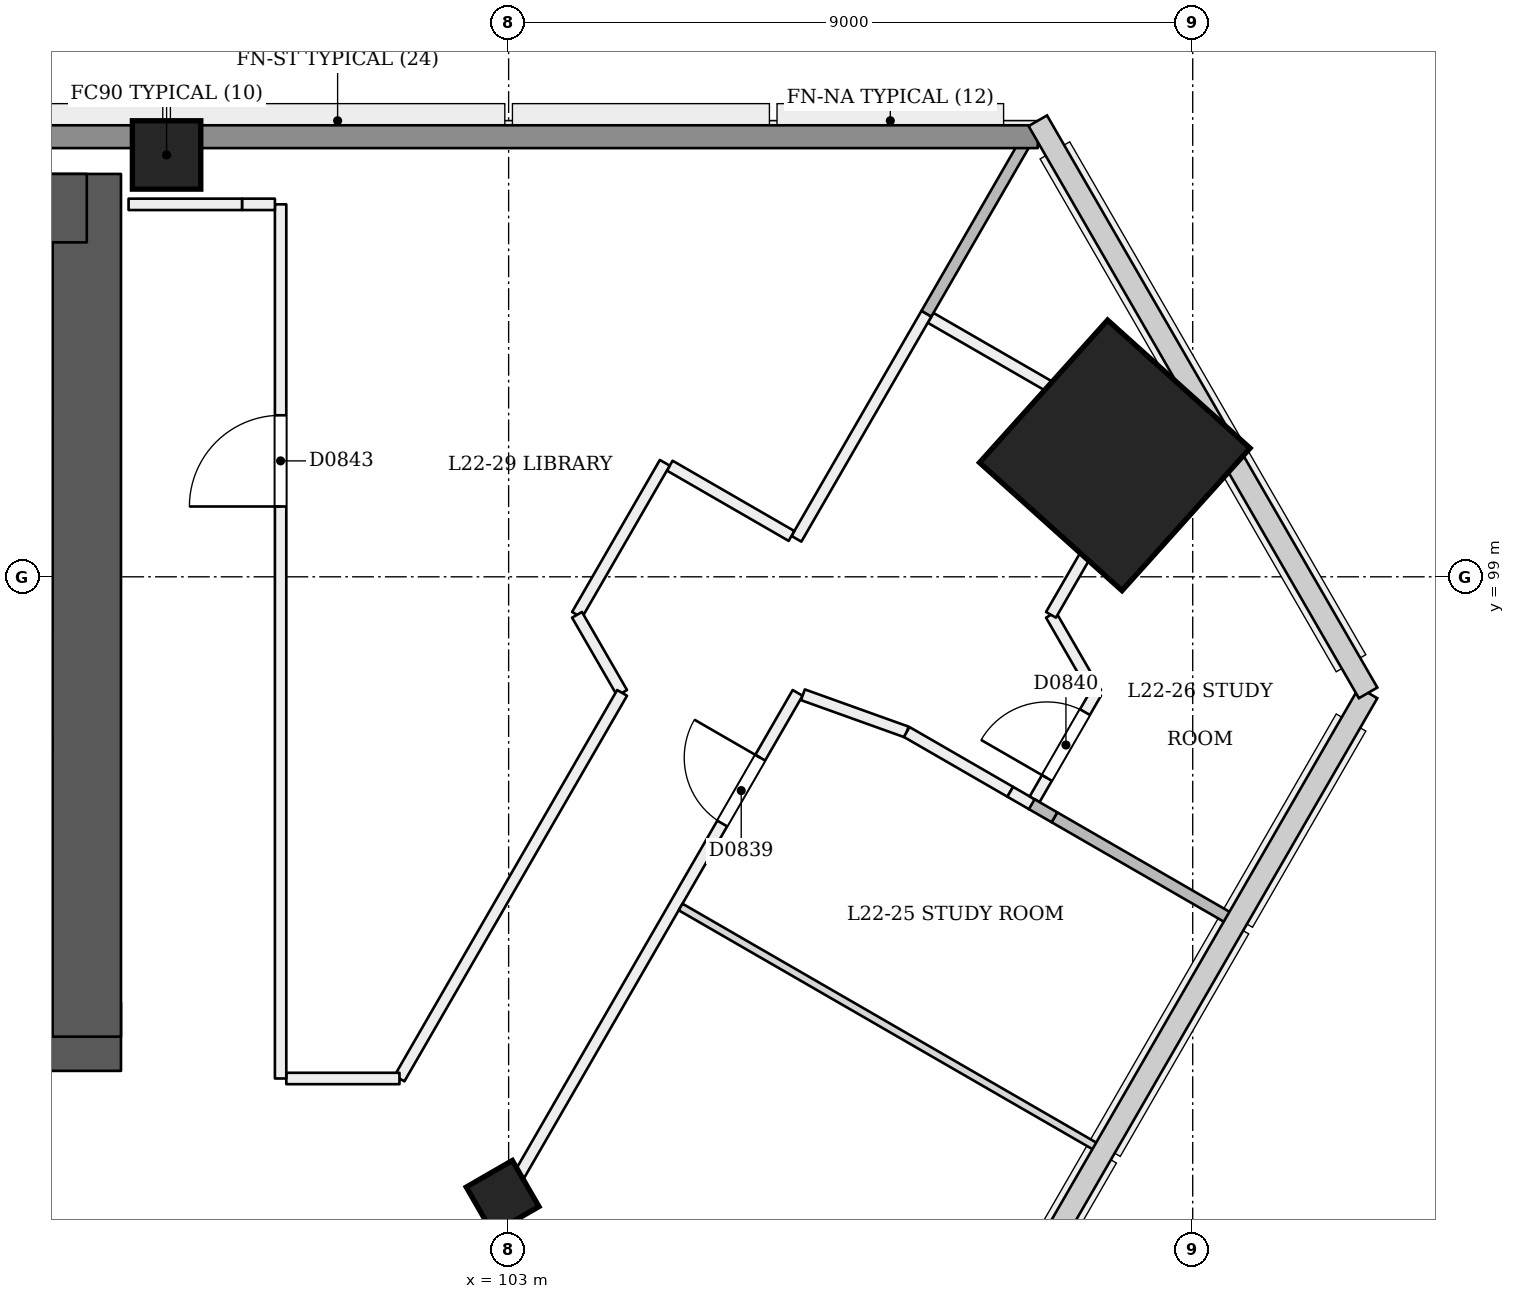
"""IFC4 building model, lengths in metres.
Left out: names, types, materials, properties, quantities, classifications, styles, units other than length and angle.
Written with IfcOpenShell. Run it as: python <this file> out.ifc"""

import sys

from ifc_helpers import new_model, si_unit, direction, frame, frame_2d, origin, origin_2d, place, context, subcontext, project, spatial, rectangle, extrude, element, fill, save


model = new_model("IFC4")
c1 = context("Model", 3, precision=1e-05, world=origin(), true_north=direction((0.0, 1.0)))
c2 = subcontext(c1, "Body", "Model", "MODEL_VIEW")
j1 = project(units=[si_unit("LENGTHUNIT", "METRE"), si_unit("PLANEANGLEUNIT", "RADIAN")], contexts=[c1])
p1 = place(None, origin())
s1 = spatial("IfcSite", under=j1, at=p1, CompositionType="ELEMENT")
p2 = place(p1, origin())
s2 = spatial("IfcBuilding", under=s1, at=p2, CompositionType="ELEMENT")
p3 = place(p2, frame((0.0, 0.0, 88.2)))
s3 = spatial("IfcBuildingStorey", under=s2, at=p3, CompositionType="ELEMENT", Elevation=88.2)
p4 = place(p3, frame((72.55, 92.95, 0.0), z_axis=(0.0, 0.0, 1.0), x_axis=(1.0, 0.0, 0.0)))
e1 = element("IfcWall", 1, at=p4, inside=s3, PredefinedType="SHEAR", context=c2, shape_type="SweptSolid", body=[
    extrude(rectangle(XDim=25.35, YDim=0.9, at=frame_2d((12.675, 0.0))), origin(), (0.0, 0.0, 1.0), 3.6),
])
p5 = place(p4, frame((1.25, 0.0, 0.0)))
e2 = element("IfcOpeningElement", 2, at=p5, cuts=e1, PredefinedType="OPENING", context=c2, shape_type="SweptSolid", body=[
    extrude(rectangle(XDim=1.2, YDim=2.1, at=frame_2d((0.6, 1.05))), frame((0.0, 0.46, 0.0), z_axis=(0.0, -1.0, 0.0), x_axis=(1.0, 0.0, 0.0)), (0.0, 0.0, 1.0), 0.921),
])
p6 = place(p4, frame((3.45, 0.0, 0.0)))
e3 = element("IfcOpeningElement", 3, at=p6, cuts=e1, PredefinedType="OPENING", context=c2, shape_type="SweptSolid", body=[
    extrude(rectangle(XDim=1.2, YDim=2.1, at=frame_2d((0.6, 1.05))), frame((0.0, 0.46, 0.0), z_axis=(0.0, -1.0, 0.0), x_axis=(1.0, 0.0, 0.0)), (0.0, 0.0, 1.0), 0.921),
])
p7 = place(p4, frame((13.45, 0.0, 0.0)))
e4 = element("IfcOpeningElement", 4, at=p7, cuts=e1, PredefinedType="OPENING", context=c2, shape_type="SweptSolid", body=[
    extrude(rectangle(XDim=1.2, YDim=2.1, at=frame_2d((0.6, 1.05))), frame((0.0, 0.46, 0.0), z_axis=(0.0, -1.0, 0.0), x_axis=(1.0, 0.0, 0.0)), (0.0, 0.0, 1.0), 0.921),
])
p8 = place(p4, frame((15.712, 0.0, 0.0)))
e5 = element("IfcOpeningElement", 5, at=p8, cuts=e1, PredefinedType="OPENING", context=c2, shape_type="SweptSolid", body=[
    extrude(rectangle(XDim=1.0, YDim=2.1, at=frame_2d((0.5, 1.05))), frame((0.0, 0.46, 0.0), z_axis=(0.0, -1.0, 0.0), x_axis=(1.0, 0.0, 0.0)), (0.0, 0.0, 1.0), 0.921),
])
p9 = place(p4, frame((18.35, 0.0, 0.0)))
e6 = element("IfcOpeningElement", 6, at=p9, cuts=e1, PredefinedType="OPENING", context=c2, shape_type="SweptSolid", body=[
    extrude(rectangle(XDim=1.0, YDim=2.1, at=frame_2d((0.5, 1.05))), frame((0.0, 0.46, 0.0), z_axis=(0.0, -1.0, 0.0), x_axis=(1.0, 0.0, 0.0)), (0.0, 0.0, 1.0), 0.921),
])
p10 = place(p4, frame((21.938, 0.0, 0.0)))
e7 = element("IfcOpeningElement", 7, at=p10, cuts=e1, PredefinedType="OPENING", context=c2, shape_type="SweptSolid", body=[
    extrude(rectangle(XDim=1.0, YDim=2.1, at=frame_2d((0.5, 1.05))), frame((0.0, 0.46, 0.0), z_axis=(0.0, -1.0, 0.0), x_axis=(1.0, 0.0, 0.0)), (0.0, 0.0, 1.0), 0.921),
])
p11 = place(p3, frame((97.45, 92.95, 0.0), z_axis=(0.0, 0.0, 1.0), x_axis=(0.0, 1.0, 0.0)))
e8 = element("IfcWall", 8, at=p11, inside=s3, PredefinedType="SHEAR", context=c2, shape_type="SweptSolid", body=[
    extrude(rectangle(XDim=11.35, YDim=0.9, at=frame_2d((5.675, 0.0))), origin(), (0.0, 0.0, 1.0), 3.6),
])
p12 = place(p3, frame((97.45, 103.85, 0.0), z_axis=(0.0, 0.0, 1.0), x_axis=(-1.0, 0.0, 0.0)))
e9 = element("IfcWall", 9, at=p12, inside=s3, PredefinedType="SHEAR", context=c2, shape_type="SweptSolid", body=[
    extrude(rectangle(XDim=25.35, YDim=0.9, at=frame_2d((12.675, 0.0))), origin(), (0.0, 0.0, 1.0), 3.6),
])
p13 = place(p3, frame((102.948, 90.796, -0.021), z_axis=(-0.022221406801, 0.038413224561, 0.999014831351), x_axis=(-0.499512940858, -0.866022219206, 0.022188685317)))
e10 = element("IfcColumn", 10, at=p13, inside=s3, PredefinedType="COLUMN", context=c2, shape_type="SweptSolid", body=[
    extrude(rectangle(XDim=0.7, YDim=0.7, at=origin_2d()), origin(), (0.0, 0.0, 1.0), 3.604),
])
p14 = place(p3, frame((111.009, 100.586, 0.0), z_axis=(-0.028401796786, 0.009286506348, 0.999553449666), x_axis=(0.498886368713, -0.866382390598, 0.022224859352)))
e11 = element("IfcColumn", 11, at=p14, inside=s3, PredefinedType="COLUMN", context=c2, shape_type="SweptSolid", body=[
    extrude(rectangle(XDim=2.52, YDim=2.52, at=origin_2d()), origin(), (0.0, 0.0, 1.0), 3.602),
])
p15 = place(p3, frame((98.5, 104.55, 0.0), z_axis=(0.0, 0.0, 1.0), x_axis=(1.0, 0.0, 0.0)))
e12 = element("IfcColumn", 12, at=p15, inside=s3, PredefinedType="COLUMN", context=c2, shape_type="SweptSolid", body=[
    extrude(rectangle(XDim=0.9, YDim=0.9, at=origin_2d()), origin(), (0.0, 0.0, 1.0), 3.6),
])
p16 = place(p3, frame((87.198, 63.517, 0.0), z_axis=(0.0, 0.0, 1.0), x_axis=(0.499999136801, 0.866025902152, 0.0)))
e13 = element("IfcWall", 13, at=p16, inside=s3, PredefinedType="PARTITIONING", context=c2, shape_type="SweptSolid", body=[
    extrude(rectangle(XDim=39.209, YDim=0.15, at=frame_2d((19.604, 0.0))), origin(), (0.0, 0.0, 1.0), 2.7),
])
p17 = place(p16, frame((2.8, 0.0, 0.0)))
e14 = element("IfcOpeningElement", 14, at=p17, cuts=e13, PredefinedType="OPENING", context=c2, shape_type="SweptSolid", body=[
    extrude(rectangle(XDim=1.2, YDim=2.1, at=frame_2d((0.6, 1.05))), frame((0.0, 0.085, 0.0), z_axis=(0.0, -1.0, 0.0), x_axis=(1.0, 0.0, 0.0)), (0.0, 0.0, 1.0), 0.171),
])
p18 = place(p16, frame((9.72, 0.0, 0.0)))
e15 = element("IfcOpeningElement", 15, at=p18, cuts=e13, PredefinedType="OPENING", context=c2, shape_type="SweptSolid", body=[
    extrude(rectangle(XDim=1.0, YDim=2.1, at=frame_2d((0.5, 1.05))), frame((0.0, 0.085, 0.0), z_axis=(0.0, -1.0, 0.0), x_axis=(1.0, 0.0, 0.0)), (0.0, 0.0, 1.0), 0.171),
])
p19 = place(p16, frame((16.395, 0.0, 0.0)))
e16 = element("IfcOpeningElement", 16, at=p19, cuts=e13, PredefinedType="OPENING", context=c2, shape_type="SweptSolid", body=[
    extrude(rectangle(XDim=1.0, YDim=2.1, at=frame_2d((0.5, 1.05))), frame((0.0, 0.085, 0.0), z_axis=(0.0, -1.0, 0.0), x_axis=(1.0, 0.0, 0.0)), (0.0, 0.0, 1.0), 0.171),
])
p20 = place(p16, frame((19.75, 0.0, 0.0)))
e17 = element("IfcOpeningElement", 17, at=p20, cuts=e13, PredefinedType="OPENING", context=c2, shape_type="SweptSolid", body=[
    extrude(rectangle(XDim=1.0, YDim=2.1, at=frame_2d((0.5, 1.05))), frame((0.0, 0.085, 0.0), z_axis=(0.0, -1.0, 0.0), x_axis=(1.0, 0.0, 0.0)), (0.0, 0.0, 1.0), 0.171),
])
p21 = place(p16, frame((25.395, 0.0, 0.0)))
e18 = element("IfcOpeningElement", 18, at=p21, cuts=e13, PredefinedType="OPENING", context=c2, shape_type="SweptSolid", body=[
    extrude(rectangle(XDim=1.0, YDim=2.1, at=frame_2d((0.5, 1.05))), frame((0.0, 0.085, 0.0), z_axis=(0.0, -1.0, 0.0), x_axis=(1.0, 0.0, 0.0)), (0.0, 0.0, 1.0), 0.171),
])
p22 = place(p16, frame((29.8, 0.0, 0.0)))
e19 = element("IfcOpeningElement", 19, at=p22, cuts=e13, PredefinedType="OPENING", context=c2, shape_type="SweptSolid", body=[
    extrude(rectangle(XDim=1.2, YDim=2.1, at=frame_2d((0.6, 1.05))), frame((0.0, 0.085, 0.0), z_axis=(0.0, -1.0, 0.0), x_axis=(1.0, 0.0, 0.0)), (0.0, 0.0, 1.0), 0.171),
])
p23 = place(p16, frame((37.225, 0.0, 0.0)))
e20 = element("IfcOpeningElement", 20, at=p23, cuts=e13, PredefinedType="OPENING", context=c2, shape_type="SweptSolid", body=[
    extrude(rectangle(XDim=1.0, YDim=2.1, at=frame_2d((0.5, 1.05))), frame((0.0, 0.085, 0.0), z_axis=(0.0, -1.0, 0.0), x_axis=(1.0, 0.0, 0.0)), (0.0, 0.0, 1.0), 0.171),
])
p24 = place(p3, frame((106.872, 97.448, 0.0), z_axis=(0.0, 0.0, 1.0), x_axis=(0.941287948334, -0.337604796059, 0.0)))
e21 = element("IfcWall", 21, at=p24, inside=s3, PredefinedType="PARTITIONING", context=c2, shape_type="SweptSolid", body=[
    extrude(rectangle(XDim=1.451, YDim=0.15, at=frame_2d((0.725, 0.0))), origin(), (0.0, 0.0, 1.0), 3.1),
])
p25 = place(p3, frame((108.237, 96.958, 0.0), z_axis=(0.0, 0.0, 1.0), x_axis=(0.86602790099, -0.499995674689, 0.0)))
e22 = element("IfcWall", 22, at=p25, inside=s3, PredefinedType="PARTITIONING", context=c2, shape_type="SweptSolid", body=[
    extrude(rectangle(XDim=1.573, YDim=0.15, at=frame_2d((0.786, 0.0))), origin(), (0.0, 0.0, 1.0), 3.1),
])
p26 = place(p3, frame((109.599, 96.172, 0.0), z_axis=(0.0, 0.0, 1.0), x_axis=(0.866115353951, -0.499844169366, 0.0)))
e23 = element("IfcWall", 23, at=p26, inside=s3, PredefinedType="PARTITIONING", context=c2, shape_type="SweptSolid", body=[
    extrude(rectangle(XDim=0.347, YDim=0.15, at=frame_2d((0.174, 0.0))), origin(), (0.0, 0.0, 1.0), 2.6),
])
p27 = place(p3, frame((109.92, 96.073, 0.0), z_axis=(0.0, 0.0, 1.0), x_axis=(0.500005767435, 0.866022073929, 0.0)))
e24 = element("IfcWall", 24, at=p27, inside=s3, PredefinedType="PARTITIONING", context=c2, shape_type="SweptSolid", body=[
    extrude(rectangle(XDim=1.616, YDim=0.15, at=frame_2d((0.808, 0.0))), origin(), (0.0, 0.0, 1.0), 2.6),
])
p28 = place(p27, frame((0.324, 0.0, 0.0)))
e25 = element("IfcOpeningElement", 25, at=p28, cuts=e24, PredefinedType="OPENING", context=c2, shape_type="SweptSolid", body=[
    extrude(rectangle(XDim=1.0, YDim=2.1, at=frame_2d((0.5, 1.05))), frame((0.0, 0.085, 0.0), z_axis=(0.0, -1.0, 0.0), x_axis=(1.0, 0.0, 0.0)), (0.0, 0.0, 1.0), 0.171),
])
p29 = place(p3, frame((110.728, 97.473, 0.0), z_axis=(0.0, 0.0, 1.0), x_axis=(-0.500013496215, 0.866017611601, 0.0)))
e26 = element("IfcWall", 26, at=p29, inside=s3, PredefinedType="PARTITIONING", context=c2, shape_type="SweptSolid", body=[
    extrude(rectangle(XDim=1.186, YDim=0.15, at=frame_2d((0.593, 0.0))), origin(), (0.0, 0.0, 1.0), 2.6),
])
p30 = place(p3, frame((110.135, 98.5, 0.0), z_axis=(0.0, 0.0, 1.0), x_axis=(0.500072327845, 0.865983641256, 0.0)))
e27 = element("IfcWall", 27, at=p30, inside=s3, PredefinedType="PARTITIONING", context=c2, shape_type="SweptSolid", body=[
    extrude(rectangle(XDim=2.517, YDim=0.15, at=frame_2d((1.258, 0.0))), origin(), (0.0, 0.0, 1.0), 2.6),
])
p31 = place(p3, frame((111.431, 100.744, 0.0), z_axis=(0.0, 0.0, 1.0), x_axis=(-0.866002163101, 0.500040251884, 0.0)))
e28 = element("IfcWall", 28, at=p31, inside=s3, PredefinedType="PARTITIONING", context=c2, shape_type="SweptSolid", body=[
    extrude(rectangle(XDim=3.325, YDim=0.15, at=frame_2d((1.663, 0.0))), origin(), (0.0, 0.0, 1.0), 3.1),
])
p32 = place(p3, frame((108.497, 102.462, 0.0), z_axis=(0.0, 0.0, 1.0), x_axis=(-0.50003140069, -0.866007273829, 0.0)))
e29 = element("IfcWall", 29, at=p32, inside=s3, PredefinedType="PARTITIONING", context=c2, shape_type="SweptSolid", body=[
    extrude(rectangle(XDim=3.42, YDim=0.15, at=frame_2d((1.71, 0.0))), origin(), (0.0, 0.0, 1.0), 2.6),
])
p33 = place(p3, frame((106.721, 99.538, 0.0), z_axis=(0.0, 0.0, 1.0), x_axis=(-0.866058118026, 0.49994333299, 0.0)))
e30 = element("IfcWall", 30, at=p33, inside=s3, PredefinedType="PARTITIONING", context=c2, shape_type="SweptSolid", body=[
    extrude(rectangle(XDim=1.85, YDim=0.15, at=frame_2d((0.925, 0.0))), origin(), (0.0, 0.0, 1.0), 3.1),
])
p34 = place(p3, frame((105.054, 100.5, 0.0), z_axis=(0.0, 0.0, 1.0), x_axis=(-0.500027479704, -0.866009537788, 0.0)))
e31 = element("IfcWall", 31, at=p34, inside=s3, PredefinedType="PARTITIONING", context=c2, shape_type="SweptSolid", body=[
    extrude(rectangle(XDim=2.309, YDim=0.15, at=frame_2d((1.155, 0.0))), origin(), (0.0, 0.0, 1.0), 3.1),
])
p35 = place(p3, frame((103.9, 98.5, 0.0), z_axis=(0.0, 0.0, 1.0), x_axis=(0.500013496215, -0.866017611601, 0.0)))
e32 = element("IfcWall", 32, at=p35, inside=s3, PredefinedType="PARTITIONING", context=c2, shape_type="SweptSolid", body=[
    extrude(rectangle(XDim=1.186, YDim=0.15, at=frame_2d((0.593, 0.0))), origin(), (0.0, 0.0, 1.0), 3.1),
])
p36 = place(p3, frame((104.493, 97.473, 0.0), z_axis=(0.0, 0.0, 1.0), x_axis=(-0.499976204152, -0.866039141888, 0.0)))
e33 = element("IfcWall", 33, at=p36, inside=s3, PredefinedType="PARTITIONING", context=c2, shape_type="SweptSolid", body=[
    extrude(rectangle(XDim=5.858, YDim=0.15, at=frame_2d((2.929, 0.0))), origin(), (0.0, 0.0, 1.0), 3.1),
])
p37 = place(p3, frame((101.564, 92.4, 0.0), z_axis=(0.0, 0.0, 1.0), x_axis=(-1.0, 0.0, 0.0)))
e34 = element("IfcWall", 34, at=p37, inside=s3, PredefinedType="PARTITIONING", context=c2, shape_type="SweptSolid", body=[
    extrude(rectangle(XDim=1.489, YDim=0.15, at=frame_2d((0.745, 0.0))), origin(), (0.0, 0.0, 1.0), 3.1),
])
p38 = place(p3, frame((100.0, 92.4, 0.0), z_axis=(0.0, 0.0, 1.0), x_axis=(0.0, 1.0, 0.0)))
e35 = element("IfcWall", 35, at=p38, inside=s3, PredefinedType="PARTITIONING", context=c2, shape_type="SweptSolid", body=[
    extrude(rectangle(XDim=11.5, YDim=0.15, at=frame_2d((5.75, 0.0))), origin(), (0.0, 0.0, 1.0), 2.6),
])
p39 = place(p38, frame((7.525, 0.0, 0.0)))
e36 = element("IfcOpeningElement", 36, at=p39, cuts=e35, PredefinedType="OPENING", context=c2, shape_type="SweptSolid", body=[
    extrude(rectangle(XDim=1.2, YDim=2.1, at=frame_2d((0.6, 1.05))), frame((0.0, 0.085, 0.0), z_axis=(0.0, -1.0, 0.0), x_axis=(1.0, 0.0, 0.0)), (0.0, 0.0, 1.0), 0.171),
])
p40 = place(p3, frame((99.925, 103.9, 0.0), z_axis=(0.0, 0.0, 1.0), x_axis=(-1.0, 0.0, 0.0)))
e37 = element("IfcWall", 37, at=p40, inside=s3, PredefinedType="PARTITIONING", context=c2, shape_type="SweptSolid", body=[
    extrude(rectangle(XDim=0.433, YDim=0.15, at=frame_2d((0.216, 0.0))), origin(), (0.0, 0.0, 1.0), 2.6),
])
p41 = place(p3, frame((99.492, 103.9, 0.0), z_axis=(0.0, 0.0, 1.0), x_axis=(-1.0, 0.0, 0.0)))
e38 = element("IfcWall", 38, at=p41, inside=s3, PredefinedType="PARTITIONING", context=c2, shape_type="SweptSolid", body=[
    extrude(rectangle(XDim=1.492, YDim=0.15, at=frame_2d((0.746, 0.0))), origin(), (0.0, 0.0, 1.0), 3.1),
])
p42 = place(p3, frame((110.758, 91.484, 0.0), z_axis=(0.0, 0.0, 1.0), x_axis=(-0.866025401434, 0.500000004071, 0.0)))
e39 = element("IfcWall", 39, at=p42, inside=s3, PredefinedType="PARTITIONING", context=c2, shape_type="SweptSolid", body=[
    extrude(rectangle(XDim=6.345, YDim=0.1, at=frame_2d((3.173, 0.0))), origin(), (0.0, 0.0, 1.0), 2.6),
])
p43 = place(p3, frame((112.498, 94.498, 0.0), z_axis=(0.0, 0.0, 1.0), x_axis=(-0.866033651025, 0.499985715088, 0.0)))
e40 = element("IfcWall", 40, at=p43, inside=s3, PredefinedType="PARTITIONING", context=c2, shape_type="SweptSolid", body=[
    extrude(rectangle(XDim=2.676, YDim=0.15, at=frame_2d((1.338, 0.0))), origin(), (0.0, 0.0, 1.0), 3.1),
])
p44 = place(p3, frame((110.181, 95.836, 0.0), z_axis=(0.0, 0.0, 1.0), x_axis=(-0.866008413041, 0.500029427677, 0.0)))
e41 = element("IfcWall", 41, at=p44, inside=s3, PredefinedType="PARTITIONING", context=c2, shape_type="SweptSolid", body=[
    extrude(rectangle(XDim=0.344, YDim=0.15, at=frame_2d((0.172, 0.0))), origin(), (0.0, 0.0, 1.0), 2.6),
])
p45 = place(p3, frame((109.904, 104.9, 0.0), z_axis=(0.0, 0.0, 1.0), x_axis=(-0.49997269499, -0.866041167766, 0.0)))
e42 = element("IfcWall", 42, at=p45, inside=s3, PredefinedType="PARTITIONING", context=c2, shape_type="SweptSolid", body=[
    extrude(rectangle(XDim=2.815, YDim=0.15, at=frame_2d((1.408, 0.0))), origin(), (0.0, 0.0, 1.0), 3.1),
])
p46 = place(p3, frame((60.038, 104.79, 0.0), z_axis=(0.0, 0.0, 1.0), x_axis=(1.0, 0.0, 0.0)))
e43 = element("IfcWall", 43, at=p46, inside=s3, PredefinedType="SOLIDWALL", context=c2, shape_type="SweptSolid", body=[
    extrude(rectangle(XDim=49.924, YDim=0.3, at=frame_2d((24.962, 0.0))), origin(), (0.0, 0.0, 1.0), 2.6),
])
p47 = place(p23, origin())
e44 = element("IfcDoor", 44, at=p47, inside=s3, OperationType="SINGLE_SWING_RIGHT", PredefinedType="NOTDEFINED", context=c2, shape_type="SweptSolid", body=[
    extrude(rectangle(XDim=1.0, YDim=2.1, at=frame_2d((0.5, 1.05))), frame((0.0, 0.025, 0.0), z_axis=(0.0, -1.0, 0.0), x_axis=(1.0, 0.0, 0.0)), (0.0, 0.0, 1.0), 0.05),
])
fill(e20, e44)
p48 = place(p28, origin())
e45 = element("IfcDoor", 45, at=p48, inside=s3, OperationType="SINGLE_SWING_LEFT", PredefinedType="NOTDEFINED", context=c2, shape_type="SweptSolid", body=[
    extrude(rectangle(XDim=1.0, YDim=2.1, at=frame_2d((0.5, 1.05))), frame((0.0, 0.025, 0.0), z_axis=(0.0, -1.0, 0.0), x_axis=(1.0, 0.0, 0.0)), (0.0, 0.0, 1.0), 0.05),
])
fill(e25, e45)
p49 = place(p39, origin())
e46 = element("IfcDoor", 46, at=p49, inside=s3, OperationType="SINGLE_SWING_LEFT", PredefinedType="NOTDEFINED", context=c2, shape_type="SweptSolid", body=[
    extrude(rectangle(XDim=1.2, YDim=2.1, at=frame_2d((0.6, 1.05))), frame((0.0, 0.025, 0.0), z_axis=(0.0, -1.0, 0.0), x_axis=(1.0, 0.0, 0.0)), (0.0, 0.0, 1.0), 0.05),
])
fill(e36, e46)
save(model, sys.argv[1])
